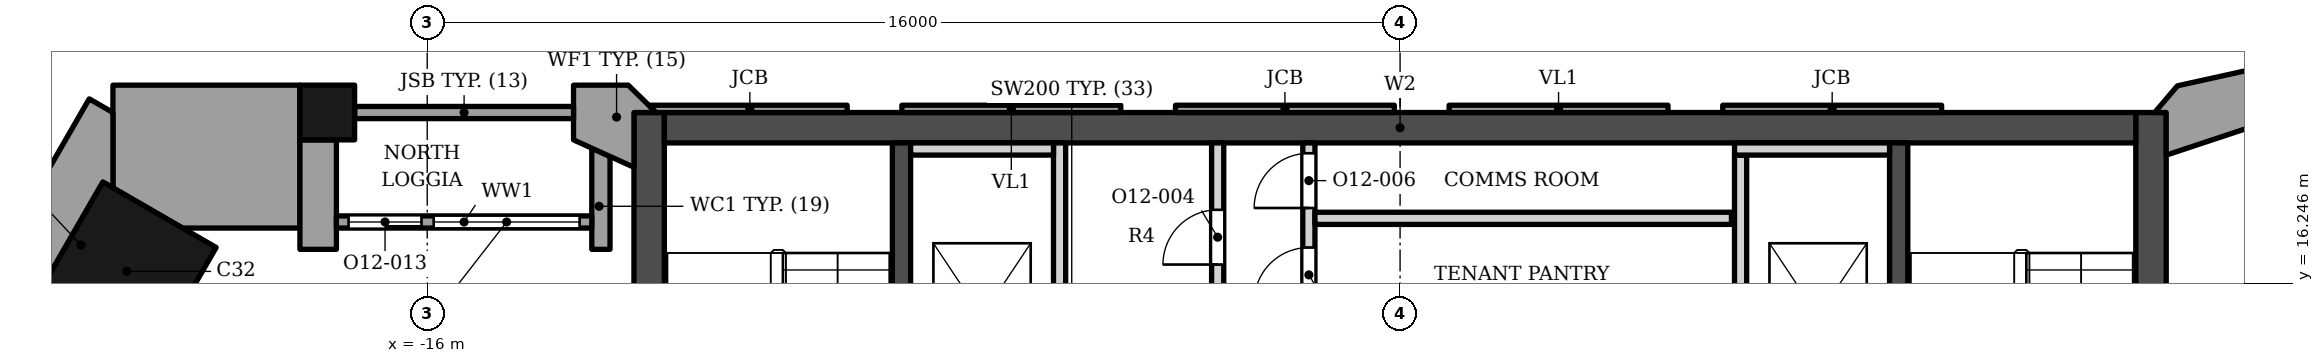
"""IFC4 building model, lengths in metres.
Left out: names, types, materials, properties, quantities, classifications, styles, units other than length and angle.
Written with IfcOpenShell. Run it as: python <this file> out.ifc"""

import sys

from ifc_helpers import new_model, si_unit, direction, frame, frame_2d, origin, origin_2d, place, context, subcontext, project, spatial, polyline, rectangle, outline, extrude, element, fill, save


model = new_model("IFC4")
c1 = context("Model", 3, precision=1e-05, world=origin(), true_north=direction((0.0, 1.0)))
c2 = subcontext(c1, "Body", "Model", "MODEL_VIEW")
j1 = project(units=[si_unit("LENGTHUNIT", "METRE"), si_unit("PLANEANGLEUNIT", "RADIAN")], contexts=[c1])
p1 = place(None, origin())
s1 = spatial("IfcSite", under=j1, at=p1, CompositionType="ELEMENT")
p2 = place(p1, origin())
s2 = spatial("IfcBuilding", under=s1, at=p2, CompositionType="ELEMENT")
p3 = place(p2, frame((0.0, 0.0, 279.4)))
s3 = spatial("IfcBuildingStorey", under=s2, at=p3, CompositionType="ELEMENT", Elevation=279.4)
p4 = place(p3, frame((-12.1, 18.802, 0.0), z_axis=(0.0, 0.0, 1.0), x_axis=(1.0, 0.0, 0.0)))
e1 = element("IfcWall", 1, at=p4, inside=s3, PredefinedType="SHEAR", context=c2, shape_type="SweptSolid", body=[
    extrude(rectangle(XDim=24.2, YDim=0.5, at=frame_2d((12.1, 0.0))), origin(), (0.0, 0.0, 1.0), 3.9),
])
p5 = place(p3, frame((-12.35, 5.253, 0.0), z_axis=(0.0, 0.0, 1.0), x_axis=(0.0, 1.0, 0.0)))
e2 = element("IfcWall", 2, at=p5, inside=s3, PredefinedType="SHEAR", context=c2, shape_type="SweptSolid", body=[
    extrude(rectangle(XDim=13.8, YDim=0.5, at=frame_2d((6.9, 0.0))), origin(), (0.0, 0.0, 1.0), 3.9),
])
p6 = place(p3, frame((-8.2, 5.253, 0.0), z_axis=(0.0, 0.0, 1.0), x_axis=(0.0, 1.0, 0.0)))
e3 = element("IfcWall", 3, at=p6, inside=s3, PredefinedType="SHEAR", context=c2, shape_type="SweptSolid", body=[
    extrude(rectangle(XDim=13.3, YDim=0.3, at=frame_2d((6.65, 0.0))), origin(), (0.0, 0.0, 1.0), 3.9),
])
p7 = place(p6, frame((7.1, 0.0, 0.0)))
e4 = element("IfcOpeningElement", 4, at=p7, cuts=e3, PredefinedType="OPENING", context=c2, shape_type="SweptSolid", body=[
    extrude(rectangle(XDim=1.4, YDim=2.1, at=frame_2d((0.7, 1.05))), frame((0.0, 0.16, 0.0), z_axis=(0.0, -1.0, 0.0), x_axis=(1.0, 0.0, 0.0)), (0.0, 0.0, 1.0), 0.32),
])
p8 = place(p6, frame((5.05, 0.0, 0.0)))
e5 = element("IfcOpeningElement", 5, at=p8, cuts=e3, PredefinedType="OPENING", context=c2, shape_type="SweptSolid", body=[
    extrude(rectangle(XDim=1.4, YDim=2.1, at=frame_2d((0.7, 1.05))), frame((0.0, 0.16, 0.0), z_axis=(0.0, -1.0, 0.0), x_axis=(1.0, 0.0, 0.0)), (0.0, 0.0, 1.0), 0.32),
])
p9 = place(p3, frame((12.35, 5.253, 0.0), z_axis=(0.0, 0.0, 1.0), x_axis=(0.0, 1.0, 0.0)))
e6 = element("IfcWall", 6, at=p9, inside=s3, PredefinedType="SHEAR", context=c2, shape_type="SweptSolid", body=[
    extrude(rectangle(XDim=13.8, YDim=0.5, at=frame_2d((6.9, 0.0))), origin(), (0.0, 0.0, 1.0), 3.9),
])
p10 = place(p3, frame((8.2, 5.253, 0.0), z_axis=(0.0, 0.0, 1.0), x_axis=(0.0, 1.0, 0.0)))
e7 = element("IfcWall", 7, at=p10, inside=s3, PredefinedType="SHEAR", context=c2, shape_type="SweptSolid", body=[
    extrude(rectangle(XDim=13.3, YDim=0.3, at=frame_2d((6.65, 0.0))), origin(), (0.0, 0.0, 1.0), 3.9),
])
p11 = place(p10, frame((7.1, 0.0, 0.0)))
e8 = element("IfcOpeningElement", 8, at=p11, cuts=e7, PredefinedType="OPENING", context=c2, shape_type="SweptSolid", body=[
    extrude(rectangle(XDim=1.4, YDim=2.1, at=frame_2d((0.7, 1.05))), frame((0.0, 0.16, 0.0), z_axis=(0.0, -1.0, 0.0), x_axis=(1.0, 0.0, 0.0)), (0.0, 0.0, 1.0), 0.32),
])
p12 = place(p10, frame((5.05, 0.0, 0.0)))
e9 = element("IfcOpeningElement", 9, at=p12, cuts=e7, PredefinedType="OPENING", context=c2, shape_type="SweptSolid", body=[
    extrude(rectangle(XDim=1.4, YDim=2.1, at=frame_2d((0.7, 1.05))), frame((0.0, 0.16, 0.0), z_axis=(0.0, -1.0, 0.0), x_axis=(1.0, 0.0, 0.0)), (0.0, 0.0, 1.0), 0.32),
])
p13 = place(p3, frame((-20.94, 16.44, 0.0), z_axis=(0.0, 0.0, 1.0), x_axis=(0.866025403784, -0.5, 0.0)))
e10 = element("IfcColumn", 10, at=p13, inside=s3, PredefinedType="COLUMN", context=c2, shape_type="SweptSolid", body=[
    extrude(rectangle(XDim=2.15, YDim=2.15, at=origin_2d()), origin(), (0.0, 0.0, 1.0), 3.9),
])
p14 = place(p3, frame((-17.644, 19.053, 0.0), z_axis=(0.0, 0.0, 1.0), x_axis=(-1.0, 0.0, 0.0)))
e11 = element("IfcColumn", 11, at=p14, inside=s3, PredefinedType="COLUMN", context=c2, shape_type="SweptSolid", body=[
    extrude(rectangle(XDim=0.9, YDim=0.9, at=origin_2d()), origin(), (0.0, 0.0, 1.0), 3.9),
])
p15 = place(p3, origin())
e12 = element("IfcWall", 12, at=p15, inside=s3, PredefinedType="SOLIDWALL", context=c2, shape_type="SweptSolid", body=[
    extrude(outline(polyline([(-12.234, 19.052), (-12.694, 19.502), (-13.594, 19.502), (-13.594, 18.603), (-12.6, 18.152), (-12.6, 19.052), (-12.234, 19.052)])), origin(), (0.0, 0.0, 1.0), 3.0),
])
p16 = place(p3, origin())
e13 = element("IfcWall", 13, at=p16, inside=s3, PredefinedType="SOLIDWALL", context=c2, shape_type="SweptSolid", body=[
    extrude(outline(polyline([(-13.294, 16.802), (-12.994, 16.802), (-12.994, 18.331), (-13.294, 18.467), (-13.294, 17.153), (-13.294, 16.802)])), origin(), (0.0, 0.0, 1.0), 3.0),
])
p17 = place(p3, origin())
e14 = element("IfcWall", 14, at=p17, inside=s3, PredefinedType="SOLIDWALL", context=c2, shape_type="SweptSolid", body=[
    extrude(outline(polyline([(-18.094, 18.603), (-18.094, 16.802), (-17.494, 16.802), (-17.494, 18.603), (-18.094, 18.603)])), origin(), (0.0, 0.0, 1.0), 3.0),
])
p18 = place(p3, origin())
e15 = element("IfcWall", 15, at=p18, inside=s3, PredefinedType="SOLIDWALL", context=c2, shape_type="SweptSolid", body=[
    extrude(outline(polyline([(5.306, 19.173), (5.306, 19.052), (8.906, 19.052), (8.906, 19.173), (5.306, 19.173)])), origin(), (0.0, 0.0, 1.0), 3.0),
])
p19 = place(p3, origin())
e16 = element("IfcWall", 16, at=p19, inside=s3, PredefinedType="ELEMENTEDWALL", context=c2, shape_type="SweptSolid", body=[
    extrude(outline(polyline([(0.806, 19.173), (0.806, 19.052), (4.406, 19.052), (4.406, 19.173), (0.806, 19.173)])), origin(), (0.0, 0.0, 1.0), 3.0),
])
p20 = place(p3, origin())
e17 = element("IfcWall", 17, at=p20, inside=s3, PredefinedType="SOLIDWALL", context=c2, shape_type="SweptSolid", body=[
    extrude(outline(polyline([(-3.694, 19.173), (-3.694, 19.052), (-0.094, 19.052), (-0.094, 19.173), (-3.694, 19.173)])), origin(), (0.0, 0.0, 1.0), 3.0),
])
p21 = place(p3, origin())
e18 = element("IfcWall", 18, at=p21, inside=s3, PredefinedType="ELEMENTEDWALL", context=c2, shape_type="SweptSolid", body=[
    extrude(outline(polyline([(-8.194, 19.173), (-8.194, 19.052), (-4.594, 19.052), (-4.594, 19.173), (-8.194, 19.173)])), origin(), (0.0, 0.0, 1.0), 3.0),
])
p22 = place(p3, origin())
e19 = element("IfcWall", 19, at=p22, inside=s3, PredefinedType="SOLIDWALL", context=c2, shape_type="SweptSolid", body=[
    extrude(outline(polyline([(-12.233, 19.052), (-9.094, 19.052), (-9.094, 19.173), (-12.355, 19.173), (-12.233, 19.052)])), origin(), (0.0, 0.0, 1.0), 3.0),
])
p23 = place(p3, frame((-13.594, 19.052, 0.0), z_axis=(0.0, 0.0, 1.0), x_axis=(-1.0, 0.0, 0.0)))
e20 = element("IfcWall", 20, at=p23, inside=s3, PredefinedType="SOLIDWALL", context=c2, shape_type="SweptSolid", body=[
    extrude(rectangle(XDim=3.6, YDim=0.2, at=frame_2d((1.8, 0.0))), origin(), (0.0, 0.0, 1.0), 3.0),
])
p24 = place(p3, frame((-13.294, 17.252, 0.0), z_axis=(0.0, 0.0, 1.0), x_axis=(-1.0, 0.0, 0.0)))
e21 = element("IfcWall", 21, at=p24, inside=s3, PredefinedType="ELEMENTEDWALL", context=c2, shape_type="SweptSolid", body=[
    extrude(rectangle(XDim=4.2, YDim=0.2, at=frame_2d((2.1, 0.0))), origin(), (0.0, 0.0, 1.0), 3.0),
])
p25 = place(p24, frame((0.2, 0.0, 0.45)))
e22 = element("IfcOpeningElement", 22, at=p25, cuts=e21, PredefinedType="OPENING", context=c2, shape_type="SweptSolid", body=[
    extrude(rectangle(XDim=2.4, YDim=2.25, at=frame_2d((1.2, 1.125))), frame((0.0, 0.11, 0.0), z_axis=(0.0, -1.0, 0.0), x_axis=(1.0, 0.0, 0.0)), (0.0, 0.0, 1.0), 0.22),
])
p26 = place(p24, frame((2.8, 0.0, 0.0)))
e23 = element("IfcOpeningElement", 23, at=p26, cuts=e21, PredefinedType="OPENING", context=c2, shape_type="SweptSolid", body=[
    extrude(rectangle(XDim=1.2, YDim=2.7, at=frame_2d((0.6, 1.35))), frame((0.0, 0.11, 0.0), z_axis=(0.0, -1.0, 0.0), x_axis=(1.0, 0.0, 0.0)), (0.0, 0.0, 1.0), 0.22),
])
p27 = place(p3, origin())
e24 = element("IfcWall", 24, at=p27, inside=s3, PredefinedType="SOLIDWALL", context=c2, shape_type="SweptSolid", body=[
    extrude(outline(polyline([(-20.024, 17.153), (-18.094, 17.153), (-18.094, 18.603), (-18.094, 18.603), (-18.094, 19.502), (-21.169, 19.502), (-21.169, 17.813), (-20.024, 17.153)])), origin(), (0.0, 0.0, 1.0), 3.0),
])
p28 = place(p3, origin())
e25 = element("IfcWall", 25, at=p28, inside=s3, PredefinedType="SOLIDWALL", context=c2, shape_type="SweptSolid", body=[
    extrude(outline(polyline([(-21.333, 17.908), (-21.169, 17.813), (-21.169, 19.052), (-21.558, 19.278), (-23.707, 15.556), (-22.141, 14.652), (-21.135, 15.311), (-22.408, 16.047), (-21.333, 17.908)])), origin(), (0.0, 0.0, 1.0), 3.0),
])
p29 = place(p3, origin())
e26 = element("IfcWall", 26, at=p29, inside=s3, PredefinedType="SOLIDWALL", context=c2, shape_type="SweptSolid", body=[
    extrude(outline(polyline([(14.201, 18.883), (14.008, 19.762), (12.784, 19.492), (12.41, 19.052), (12.6, 19.052), (12.6, 18.352), (14.201, 18.883)])), origin(), (0.0, 0.0, 1.0), 3.0),
])
p30 = place(p3, frame((-5.6, 14.253, 0.0), z_axis=(0.0, 0.0, 1.0), x_axis=(0.0, 1.0, 0.0)))
e27 = element("IfcWall", 27, at=p30, inside=s3, PredefinedType="SOLIDWALL", context=c2, shape_type="SweptSolid", body=[
    extrude(rectangle(XDim=4.3, YDim=0.2, at=frame_2d((2.15, 0.0))), origin(), (0.0, 0.0, 1.0), 3.73),
])
p31 = place(p3, frame((5.6, 15.453, 0.0), z_axis=(0.0, 0.0, 1.0), x_axis=(0.0, 1.0, 0.0)))
e28 = element("IfcWall", 28, at=p31, inside=s3, PredefinedType="SOLIDWALL", context=c2, shape_type="SweptSolid", body=[
    extrude(rectangle(XDim=2.9, YDim=0.2, at=frame_2d((1.45, 0.0))), origin(), (0.0, 0.0, 1.0), 3.73),
])
p32 = place(p3, frame((-3.0, 15.503, 0.0), z_axis=(0.0, 0.0, 1.0), x_axis=(0.0, 1.0, 0.0)))
e29 = element("IfcWall", 29, at=p32, inside=s3, PredefinedType="SOLIDWALL", context=c2, shape_type="SweptSolid", body=[
    extrude(rectangle(XDim=3.05, YDim=0.2, at=frame_2d((1.525, 0.0))), origin(), (0.0, 0.0, 1.0), 3.73),
])
p33 = place(p32, frame((1.05, 0.0, 0.0)))
e30 = element("IfcOpeningElement", 30, at=p33, cuts=e29, PredefinedType="OPENING", context=c2, shape_type="SweptSolid", body=[
    extrude(rectangle(XDim=0.9, YDim=2.1, at=frame_2d((0.45, 1.05))), frame((0.0, 0.11, 0.0), z_axis=(0.0, -1.0, 0.0), x_axis=(1.0, 0.0, 0.0)), (0.0, 0.0, 1.0), 0.22),
])
p34 = place(p3, frame((-1.5, 15.503, 0.0), z_axis=(0.0, 0.0, 1.0), x_axis=(0.0, 1.0, 0.0)))
e31 = element("IfcWall", 31, at=p34, inside=s3, PredefinedType="SOLIDWALL", context=c2, shape_type="SweptSolid", body=[
    extrude(rectangle(XDim=3.05, YDim=0.2, at=frame_2d((1.525, 0.0))), origin(), (0.0, 0.0, 1.0), 3.73),
])
p35 = place(p34, frame((0.43, 0.0, 0.0)))
e32 = element("IfcOpeningElement", 32, at=p35, cuts=e31, PredefinedType="OPENING", context=c2, shape_type="SweptSolid", body=[
    extrude(rectangle(XDim=0.9, YDim=2.1, at=frame_2d((0.45, 1.05))), frame((0.0, 0.11, 0.0), z_axis=(0.0, -1.0, 0.0), x_axis=(1.0, 0.0, 0.0)), (0.0, 0.0, 1.0), 0.22),
])
p36 = place(p34, frame((1.98, 0.0, 0.0)))
e33 = element("IfcOpeningElement", 33, at=p36, cuts=e31, PredefinedType="OPENING", context=c2, shape_type="SweptSolid", body=[
    extrude(rectangle(XDim=0.9, YDim=2.1, at=frame_2d((0.45, 1.05))), frame((0.0, 0.11, 0.0), z_axis=(0.0, -1.0, 0.0), x_axis=(1.0, 0.0, 0.0)), (0.0, 0.0, 1.0), 0.22),
])
p37 = place(p3, frame((-1.4, 17.312, 0.0), z_axis=(0.0, 0.0, 1.0), x_axis=(1.0, 0.0, 0.0)))
e34 = element("IfcWall", 34, at=p37, inside=s3, PredefinedType="SOLIDWALL", context=c2, shape_type="SweptSolid", body=[
    extrude(rectangle(XDim=6.85, YDim=0.2, at=frame_2d((3.425, 0.0))), origin(), (0.0, 0.0, 1.0), 3.73),
])
p38 = place(p3, frame((-8.05, 18.453, 0.0), z_axis=(0.0, 0.0, 1.0), x_axis=(1.0, 0.0, 0.0)))
e35 = element("IfcWall", 35, at=p38, inside=s3, PredefinedType="SOLIDWALL", context=c2, shape_type="SweptSolid", body=[
    extrude(rectangle(XDim=2.35, YDim=0.2, at=frame_2d((1.175, 0.0))), origin(), (0.0, 0.0, 1.0), 3.73),
])
p39 = place(p3, frame((5.5, 18.453, 0.0), z_axis=(0.0, 0.0, 1.0), x_axis=(1.0, 0.0, 0.0)))
e36 = element("IfcWall", 36, at=p39, inside=s3, PredefinedType="SOLIDWALL", context=c2, shape_type="SweptSolid", body=[
    extrude(rectangle(XDim=2.55, YDim=0.2, at=frame_2d((1.275, 0.0))), origin(), (0.0, 0.0, 1.0), 3.73),
])
p40 = place(p25, origin())
e37 = element("IfcWindow", 37, at=p40, inside=s3, PartitioningType="SINGLE_PANEL", PredefinedType="WINDOW", context=c2, shape_type="SweptSolid", body=[
    extrude(rectangle(XDim=2.4, YDim=2.25, at=frame_2d((1.2, 1.125))), frame((0.0, 0.03, 0.0), z_axis=(0.0, -1.0, 0.0), x_axis=(1.0, 0.0, 0.0)), (0.0, 0.0, 1.0), 0.06),
])
fill(e22, e37)
p41 = place(p26, origin())
e38 = element("IfcDoor", 38, at=p41, inside=s3, OperationType="SINGLE_SWING_LEFT", PredefinedType="DOOR", context=c2, shape_type="SweptSolid", body=[
    extrude(rectangle(XDim=1.2, YDim=2.7, at=frame_2d((0.6, 1.35))), frame((0.0, 0.025, 0.0), z_axis=(0.0, -1.0, 0.0), x_axis=(1.0, 0.0, 0.0)), (0.0, 0.0, 1.0), 0.05),
])
fill(e23, e38)
p42 = place(p33, origin())
e39 = element("IfcDoor", 39, at=p42, inside=s3, OperationType="SINGLE_SWING_LEFT", PredefinedType="DOOR", context=c2, shape_type="SweptSolid", body=[
    extrude(rectangle(XDim=0.9, YDim=2.1, at=frame_2d((0.45, 1.05))), frame((0.0, 0.025, 0.0), z_axis=(0.0, -1.0, 0.0), x_axis=(1.0, 0.0, 0.0)), (0.0, 0.0, 1.0), 0.05),
])
fill(e30, e39)
p43 = place(p35, origin())
e40 = element("IfcDoor", 40, at=p43, inside=s3, OperationType="SINGLE_SWING_LEFT", PredefinedType="DOOR", context=c2, shape_type="SweptSolid", body=[
    extrude(rectangle(XDim=0.9, YDim=2.1, at=frame_2d((0.45, 1.05))), frame((0.0, 0.025, 0.0), z_axis=(0.0, -1.0, 0.0), x_axis=(1.0, 0.0, 0.0)), (0.0, 0.0, 1.0), 0.05),
])
fill(e32, e40)
p44 = place(p36, origin())
e41 = element("IfcDoor", 41, at=p44, inside=s3, OperationType="SINGLE_SWING_LEFT", PredefinedType="DOOR", context=c2, shape_type="SweptSolid", body=[
    extrude(rectangle(XDim=0.9, YDim=2.1, at=frame_2d((0.45, 1.05))), frame((0.0, 0.025, 0.0), z_axis=(0.0, -1.0, 0.0), x_axis=(1.0, 0.0, 0.0)), (0.0, 0.0, 1.0), 0.05),
])
fill(e33, e41)
save(model, sys.argv[1])
